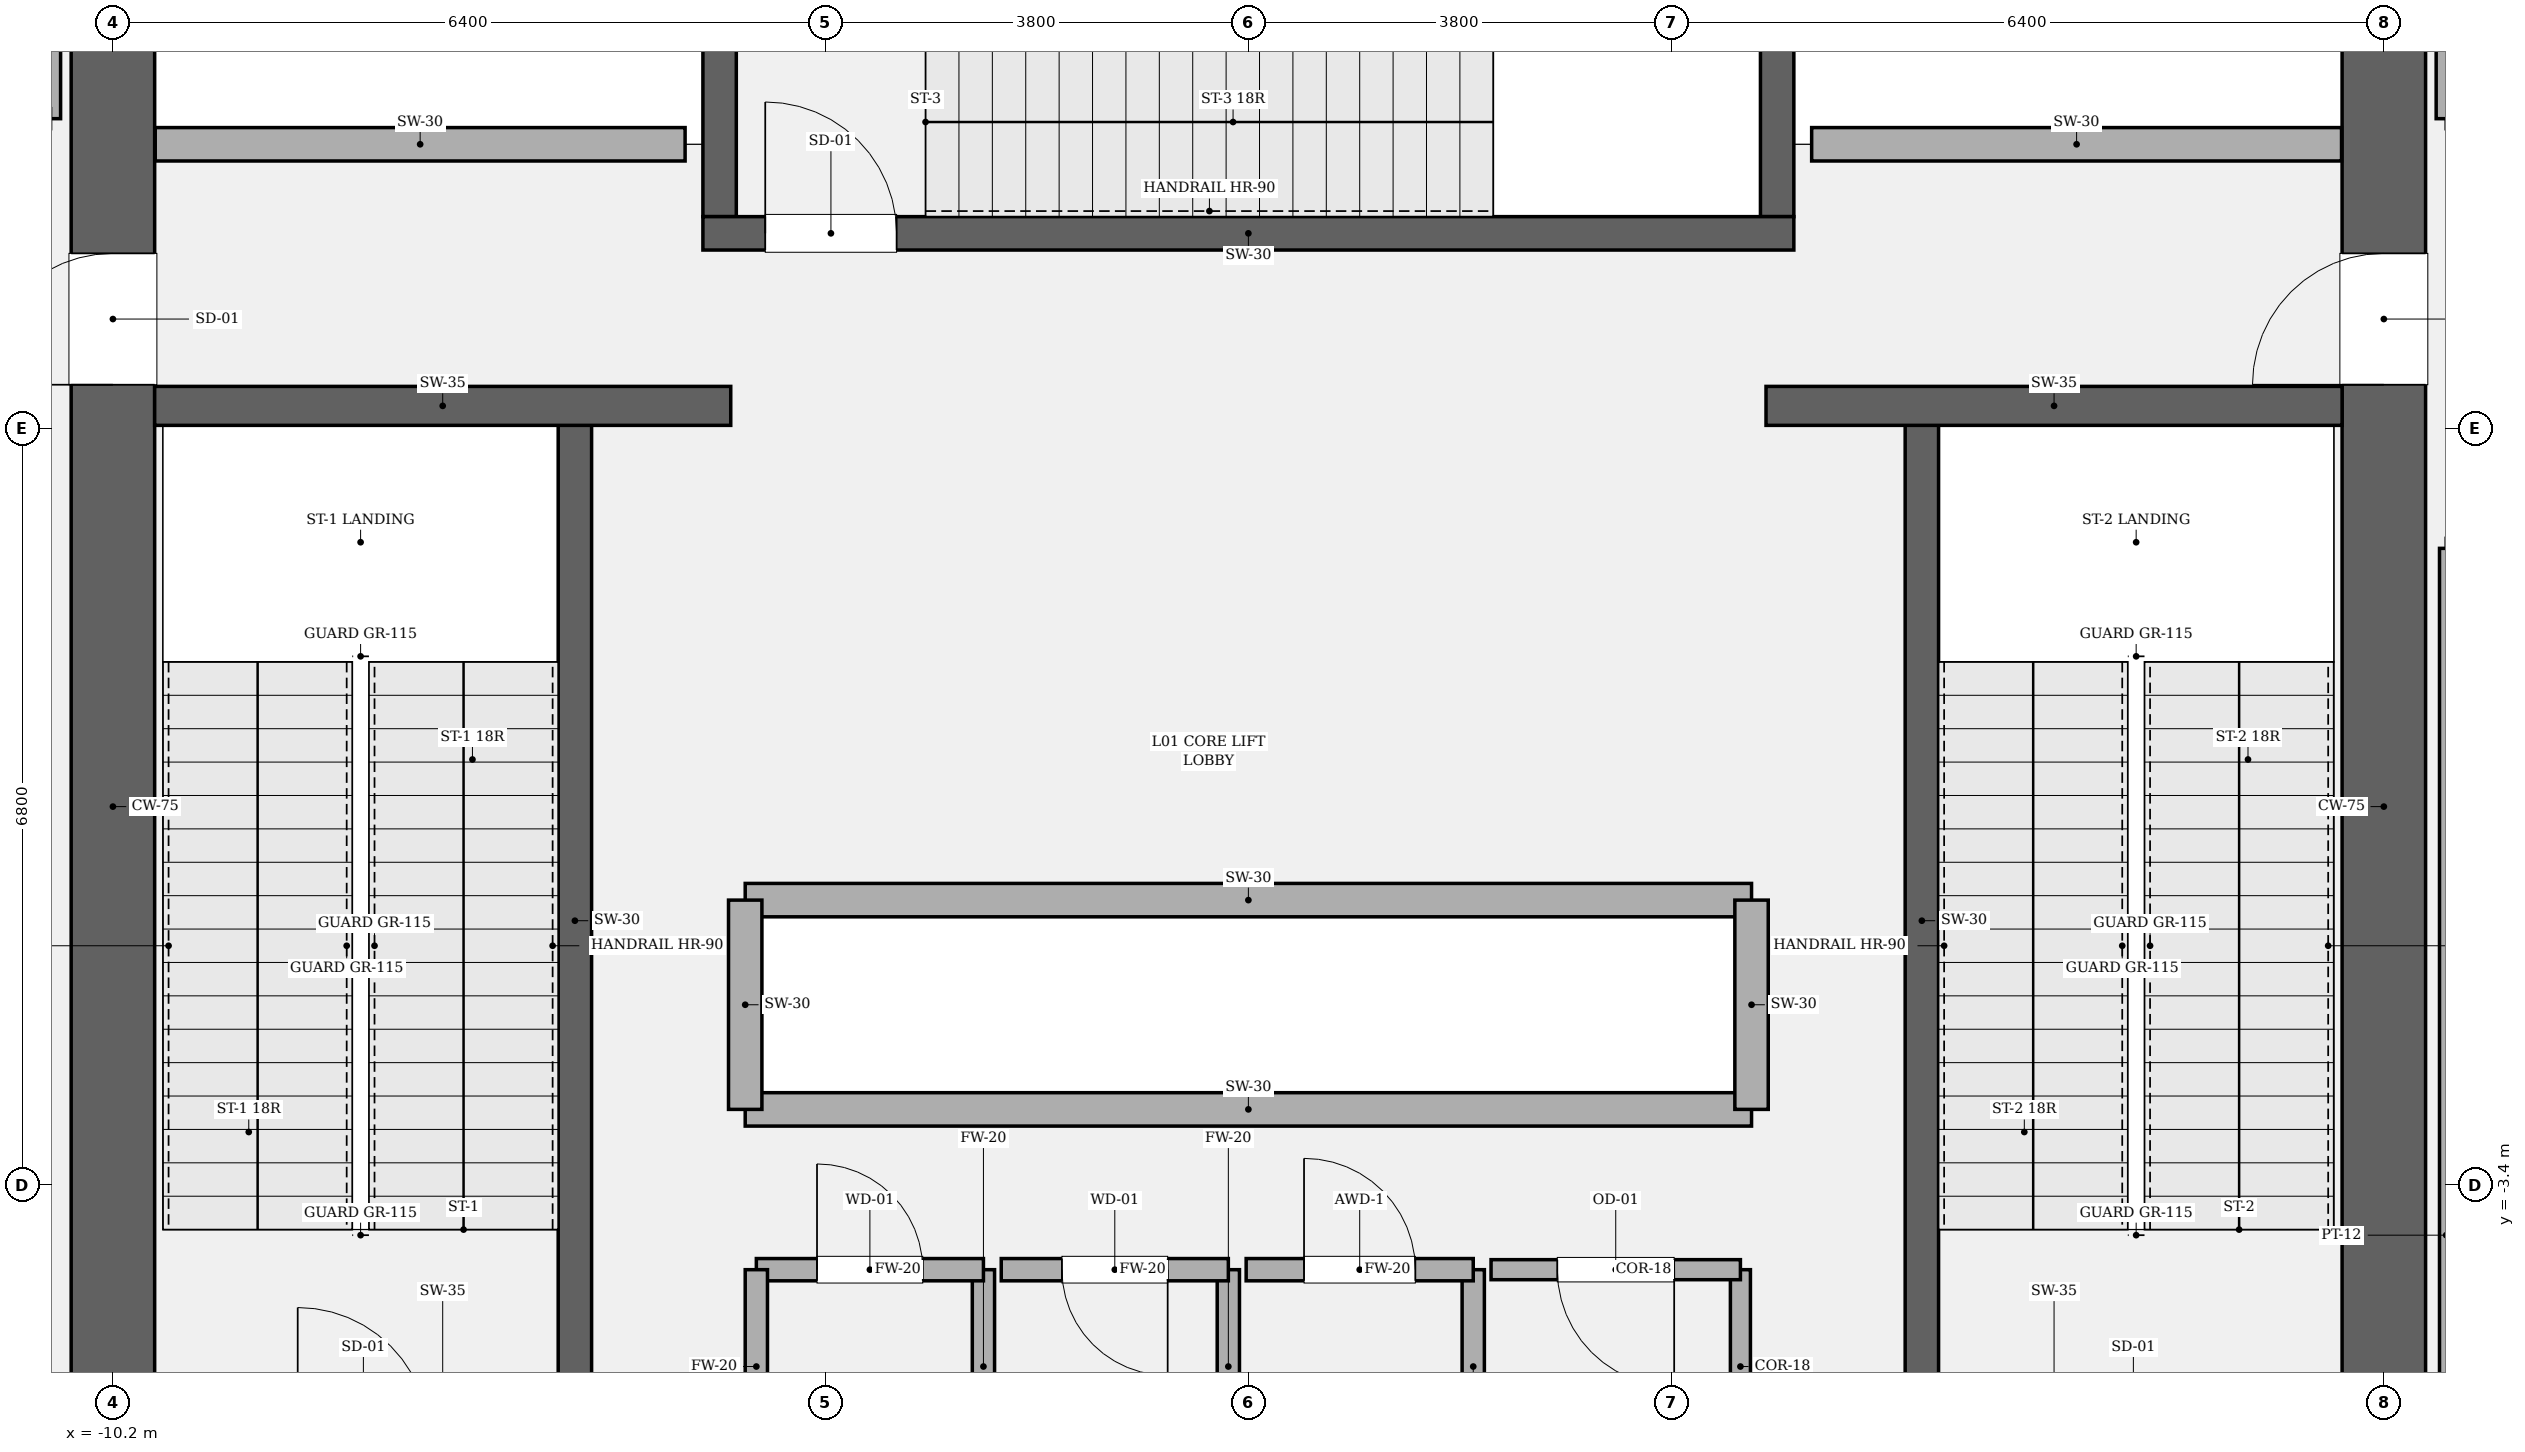
"""IFC4 building model, lengths in metres.
Left out: names, types, materials, properties, quantities, classifications, styles, units other than length and angle.
Written with IfcOpenShell. Run it as: python <this file> out.ifc"""

import sys

from ifc_helpers import new_model, si_unit, direction, frame, frame_2d, origin, place, context, subcontext, project, spatial, rectangle, extrude, element, fill, save


model = new_model("IFC4")
c1 = context("Model", 3, precision=1e-05, world=origin(), true_north=direction((0.0, 1.0)))
c2 = subcontext(c1, "Body", "Model", "MODEL_VIEW")
j1 = project(units=[si_unit("LENGTHUNIT", "METRE"), si_unit("PLANEANGLEUNIT", "RADIAN")], contexts=[c1])
p1 = place(None, origin())
s1 = spatial("IfcSite", under=j1, at=p1, CompositionType="ELEMENT")
p2 = place(p1, origin())
s2 = spatial("IfcBuilding", under=s1, at=p2, CompositionType="ELEMENT")
p3 = place(p2, frame((0.0, 0.0, 6.0)))
s3 = spatial("IfcBuildingStorey", under=s2, at=p3, CompositionType="ELEMENT", Elevation=6.0)
p4 = place(p3, frame((-10.2, -8.825, 0.0), z_axis=(0.0, 0.0, 1.0), x_axis=(0.0, 1.0, 0.0)))
e1 = element("IfcWall", 1, at=p4, inside=s3, PredefinedType="SHEAR", context=c2, shape_type="SweptSolid", body=[
    extrude(rectangle(XDim=17.65, YDim=0.75, at=frame_2d((8.825, 0.0))), origin(), (0.0, 0.0, 1.0), 5.4),
])
p5 = place(p4, frame((12.615, 0.0, 0.0)))
e2 = element("IfcOpeningElement", 2, at=p5, cuts=e1, PredefinedType="OPENING", context=c2, shape_type="SweptSolid", body=[
    extrude(rectangle(XDim=1.18, YDim=2.2, at=frame_2d((0.59, 1.1))), frame((0.0, 0.385, 0.0), z_axis=(0.0, -1.0, 0.0), x_axis=(1.0, 0.0, 0.0)), (0.0, 0.0, 1.0), 0.77),
])
p6 = place(p3, frame((10.2, 8.825, 0.0), z_axis=(0.0, 0.0, 1.0), x_axis=(0.0, -1.0, 0.0)))
e3 = element("IfcWall", 3, at=p6, inside=s3, PredefinedType="SHEAR", context=c2, shape_type="SweptSolid", body=[
    extrude(rectangle(XDim=17.65, YDim=0.75, at=frame_2d((8.825, 0.0))), origin(), (0.0, 0.0, 1.0), 5.4),
])
p7 = place(p6, frame((3.855, 0.0, 0.0)))
e4 = element("IfcOpeningElement", 4, at=p7, cuts=e3, PredefinedType="OPENING", context=c2, shape_type="SweptSolid", body=[
    extrude(rectangle(XDim=1.18, YDim=2.2, at=frame_2d((0.59, 1.1))), frame((0.0, 0.385, 0.0), z_axis=(0.0, -1.0, 0.0), x_axis=(1.0, 0.0, 0.0)), (0.0, 0.0, 1.0), 0.77),
])
for number, where, z_axis, x_axis in (
    (5, (-6.05, -5.5, 0.0), (0.0, 0.0, 1.0), (0.0, 1.0, 0.0)),
    (6, (6.05, 3.45, 0.0), (0.0, 0.0, 1.0), (0.0, -1.0, 0.0)),
):
    element("IfcWall", number, at=place(p3, frame(where, z_axis=z_axis, x_axis=x_axis)), inside=s3, PredefinedType="SOLIDWALL", context=c2, shape_type="SweptSolid", body=[
        extrude(rectangle(XDim=8.95, YDim=0.3, at=frame_2d((4.475, 0.0))), origin(), (0.0, 0.0, 1.0), 5.4),
    ])
for number, where, z_axis, x_axis in (
    (7, (-4.75, 5.3, 0.0), (0.0, 0.0, 1.0), (0.0, 1.0, 0.0)),
    (8, (4.75, 8.825, 0.0), (0.0, 0.0, 1.0), (0.0, -1.0, 0.0)),
):
    element("IfcWall", number, at=place(p3, frame(where, z_axis=z_axis, x_axis=x_axis)), inside=s3, PredefinedType="SOLIDWALL", context=c2, shape_type="SweptSolid", body=[
        extrude(rectangle(XDim=3.525, YDim=0.3, at=frame_2d((1.762, 0.0))), origin(), (0.0, 0.0, 1.0), 5.4),
    ])
p8 = place(p3, frame((-4.9, 5.15, 0.0), z_axis=(0.0, 0.0, 1.0), x_axis=(1.0, 0.0, 0.0)))
e9 = element("IfcWall", 9, at=p8, inside=s3, PredefinedType="SOLIDWALL", context=c2, shape_type="SweptSolid", body=[
    extrude(rectangle(XDim=9.8, YDim=0.3, at=frame_2d((4.9, 0.0))), origin(), (0.0, 0.0, 1.0), 5.4),
])
p9 = place(p8, frame((0.56, 0.0, 0.0)))
e10 = element("IfcOpeningElement", 10, at=p9, cuts=e9, PredefinedType="OPENING", context=c2, shape_type="SweptSolid", body=[
    extrude(rectangle(XDim=1.18, YDim=2.2, at=frame_2d((0.59, 1.1))), frame((0.0, 0.16, 0.0), z_axis=(0.0, -1.0, 0.0), x_axis=(1.0, 0.0, 0.0)), (0.0, 0.0, 1.0), 0.32),
])
for number, where, z_axis, x_axis in (
    (11, (-9.825, 3.6, 0.0), (0.0, 0.0, 1.0), (1.0, 0.0, 0.0)),
    (12, (4.65, 3.6, 0.0), (0.0, 0.0, 1.0), (1.0, 0.0, 0.0)),
):
    element("IfcWall", number, at=place(p3, frame(where, z_axis=z_axis, x_axis=x_axis)), inside=s3, PredefinedType="SOLIDWALL", context=c2, shape_type="SweptSolid", body=[
        extrude(rectangle(XDim=5.175, YDim=0.35, at=frame_2d((2.587, 0.0))), origin(), (0.0, 0.0, 1.0), 5.4),
    ])
for number, where, z_axis, x_axis in (
    (13, (-4.52, -0.84, 0.0), (0.0, 0.0, 1.0), (1.0, 0.0, 0.0)),
    (14, (-4.52, -2.72, 0.0), (0.0, 0.0, 1.0), (1.0, 0.0, 0.0)),
):
    element("IfcWall", number, at=place(p3, frame(where, z_axis=z_axis, x_axis=x_axis)), inside=s3, PredefinedType="SOLIDWALL", context=c2, shape_type="SweptSolid", body=[
        extrude(rectangle(XDim=9.04, YDim=0.3, at=frame_2d((4.52, 0.0))), origin(), (0.0, 0.0, 1.0), 5.12),
    ])
for number, where, z_axis, x_axis in (
    (15, (-4.52, -2.72, 0.0), (0.0, 0.0, 1.0), (0.0, 1.0, 0.0)),
    (16, (4.52, -2.72, 0.0), (0.0, 0.0, 1.0), (0.0, 1.0, 0.0)),
):
    element("IfcWall", number, at=place(p3, frame(where, z_axis=z_axis, x_axis=x_axis)), inside=s3, PredefinedType="SOLIDWALL", context=c2, shape_type="SweptSolid", body=[
        extrude(rectangle(XDim=1.88, YDim=0.3, at=frame_2d((0.94, 0.0))), origin(), (0.0, 0.0, 1.0), 5.12),
    ])
for number, where, z_axis, x_axis in (
    (17, (-9.82, 5.95, 0.0), (0.0, 0.0, 1.0), (1.0, 0.0, 0.0)),
    (18, (5.06, 5.95, 0.0), (0.0, 0.0, 1.0), (1.0, 0.0, 0.0)),
):
    element("IfcWall", number, at=place(p3, frame(where, z_axis=z_axis, x_axis=x_axis)), inside=s3, PredefinedType="SOLIDWALL", context=c2, shape_type="SweptSolid", body=[
        extrude(rectangle(XDim=4.76, YDim=0.3, at=frame_2d((2.38, 0.0))), origin(), (0.0, 0.0, 1.0), 5.12),
    ])
p10 = place(p3, frame((-2.38, -5.9, 0.0), z_axis=(0.0, 0.0, 1.0), x_axis=(0.0, 1.0, 0.0)))
e19 = element("IfcWall", 19, at=p10, inside=s3, PredefinedType="SOLIDWALL", context=c2, shape_type="SweptSolid", body=[
    extrude(rectangle(XDim=1.74, YDim=0.2, at=frame_2d((0.87, 0.0))), origin(), (0.0, 0.0, 1.0), 5.12),
])
p11 = place(p3, frame((-2.38, -4.16, 0.0), z_axis=(0.0, 0.0, 1.0), x_axis=(-1.0, 0.0, 0.0)))
e20 = element("IfcWall", 20, at=p11, inside=s3, PredefinedType="SOLIDWALL", context=c2, shape_type="SweptSolid", body=[
    extrude(rectangle(XDim=2.04, YDim=0.2, at=frame_2d((1.02, 0.0))), origin(), (0.0, 0.0, 1.0), 5.12),
])
p12 = place(p11, frame((0.545, 0.0, 0.0)))
e21 = element("IfcOpeningElement", 21, at=p12, cuts=e20, PredefinedType="OPENING", context=c2, shape_type="SweptSolid", body=[
    extrude(rectangle(XDim=0.95, YDim=2.15, at=frame_2d((0.475, 1.075))), frame((0.0, 0.11, 0.0), z_axis=(0.0, -1.0, 0.0), x_axis=(1.0, 0.0, 0.0)), (0.0, 0.0, 1.0), 0.22),
])
for number, where, z_axis, x_axis in (
    (22, (-4.42, -4.16, 0.0), (0.0, 0.0, 1.0), (0.0, -1.0, 0.0)),
    (23, (-0.18, -5.9, 0.0), (0.0, 0.0, 1.0), (0.0, 1.0, 0.0)),
):
    element("IfcWall", number, at=place(p3, frame(where, z_axis=z_axis, x_axis=x_axis)), inside=s3, PredefinedType="SOLIDWALL", context=c2, shape_type="SweptSolid", body=[
        extrude(rectangle(XDim=1.74, YDim=0.2, at=frame_2d((0.87, 0.0))), origin(), (0.0, 0.0, 1.0), 5.12),
    ])
p13 = place(p3, frame((-0.18, -4.16, 0.0), z_axis=(0.0, 0.0, 1.0), x_axis=(-1.0, 0.0, 0.0)))
e24 = element("IfcWall", 24, at=p13, inside=s3, PredefinedType="SOLIDWALL", context=c2, shape_type="SweptSolid", body=[
    extrude(rectangle(XDim=2.04, YDim=0.2, at=frame_2d((1.02, 0.0))), origin(), (0.0, 0.0, 1.0), 5.12),
])
p14 = place(p13, frame((0.545, 0.0, 0.0)))
e25 = element("IfcOpeningElement", 25, at=p14, cuts=e24, PredefinedType="OPENING", context=c2, shape_type="SweptSolid", body=[
    extrude(rectangle(XDim=0.95, YDim=2.15, at=frame_2d((0.475, 1.075))), frame((0.0, 0.11, 0.0), z_axis=(0.0, -1.0, 0.0), x_axis=(1.0, 0.0, 0.0)), (0.0, 0.0, 1.0), 0.22),
])
p15 = place(p3, frame((2.02, -5.9, 0.0), z_axis=(0.0, 0.0, 1.0), x_axis=(0.0, 1.0, 0.0)))
e26 = element("IfcWall", 26, at=p15, inside=s3, PredefinedType="SOLIDWALL", context=c2, shape_type="SweptSolid", body=[
    extrude(rectangle(XDim=1.74, YDim=0.2, at=frame_2d((0.87, 0.0))), origin(), (0.0, 0.0, 1.0), 5.12),
])
p16 = place(p3, frame((2.02, -4.16, 0.0), z_axis=(0.0, 0.0, 1.0), x_axis=(-1.0, 0.0, 0.0)))
e27 = element("IfcWall", 27, at=p16, inside=s3, PredefinedType="SOLIDWALL", context=c2, shape_type="SweptSolid", body=[
    extrude(rectangle(XDim=2.04, YDim=0.2, at=frame_2d((1.02, 0.0))), origin(), (0.0, 0.0, 1.0), 5.12),
])
p17 = place(p16, frame((0.52, 0.0, 0.0)))
e28 = element("IfcOpeningElement", 28, at=p17, cuts=e27, PredefinedType="OPENING", context=c2, shape_type="SweptSolid", body=[
    extrude(rectangle(XDim=1.0, YDim=2.15, at=frame_2d((0.5, 1.075))), frame((0.0, 0.11, 0.0), z_axis=(0.0, -1.0, 0.0), x_axis=(1.0, 0.0, 0.0)), (0.0, 0.0, 1.0), 0.22),
])
p18 = place(p3, frame((4.42, -5.9, 0.0), z_axis=(0.0, 0.0, 1.0), x_axis=(0.0, 1.0, 0.0)))
e29 = element("IfcWall", 29, at=p18, inside=s3, PredefinedType="PARTITIONING", context=c2, shape_type="SweptSolid", body=[
    extrude(rectangle(XDim=1.74, YDim=0.18, at=frame_2d((0.87, 0.0))), origin(), (0.0, 0.0, 1.0), 5.12),
])
p19 = place(p3, frame((4.42, -4.16, 0.0), z_axis=(0.0, 0.0, 1.0), x_axis=(-1.0, 0.0, 0.0)))
e30 = element("IfcWall", 30, at=p19, inside=s3, PredefinedType="PARTITIONING", context=c2, shape_type="SweptSolid", body=[
    extrude(rectangle(XDim=2.24, YDim=0.18, at=frame_2d((1.12, 0.0))), origin(), (0.0, 0.0, 1.0), 5.12),
])
p20 = place(p19, frame((0.595, 0.0, 0.0)))
e31 = element("IfcOpeningElement", 31, at=p20, cuts=e30, PredefinedType="OPENING", context=c2, shape_type="SweptSolid", body=[
    extrude(rectangle(XDim=1.05, YDim=2.2, at=frame_2d((0.525, 1.1))), frame((0.0, 0.1, 0.0), z_axis=(0.0, -1.0, 0.0), x_axis=(1.0, 0.0, 0.0)), (0.0, 0.0, 1.0), 0.2),
])
for number, where, z_axis, x_axis in (
    (32, (-10.76, 14.42, 0.0), (0.0, 0.0, 1.0), (0.0, -1.0, 0.0)),
    (33, (10.76, 6.18, 0.0), (0.0, 0.0, 1.0), (0.0, 1.0, 0.0)),
):
    element("IfcWall", number, at=place(p3, frame(where, z_axis=z_axis, x_axis=x_axis)), inside=s3, PredefinedType="PARTITIONING", context=c2, shape_type="SweptSolid", body=[
        extrude(rectangle(XDim=8.24, YDim=0.18, at=frame_2d((4.12, 0.0))), origin(), (0.0, 0.0, 1.0), 4.414),
    ])
p21 = place(p3, frame((10.76, -10.02, 0.0), z_axis=(0.0, 0.0, 1.0), x_axis=(0.0, 1.0, 0.0)))
e34 = element("IfcWall", 34, at=p21, inside=s3, PredefinedType="PARTITIONING", context=c2, shape_type="SweptSolid", body=[
    extrude(rectangle(XDim=12.34, YDim=0.12, at=frame_2d((6.17, 0.0))), origin(), (0.0, 0.0, 1.0), 4.414),
])
p22 = place(p9, origin())
e35 = element("IfcDoor", 35, at=p22, inside=s3, OperationType="SINGLE_SWING_LEFT", PredefinedType="DOOR", context=c2, shape_type="SweptSolid", body=[
    extrude(rectangle(XDim=1.18, YDim=2.2, at=frame_2d((0.59, 1.1))), frame((0.0, 0.025, 0.0), z_axis=(0.0, -1.0, 0.0), x_axis=(1.0, 0.0, 0.0)), (0.0, 0.0, 1.0), 0.05),
])
fill(e10, e35)
p23 = place(p5, origin())
e36 = element("IfcDoor", 36, at=p23, inside=s3, OperationType="SINGLE_SWING_LEFT", PredefinedType="DOOR", context=c2, shape_type="SweptSolid", body=[
    extrude(rectangle(XDim=1.18, YDim=2.2, at=frame_2d((0.59, 1.1))), frame((0.0, 0.025, 0.0), z_axis=(0.0, -1.0, 0.0), x_axis=(1.0, 0.0, 0.0)), (0.0, 0.0, 1.0), 0.05),
])
fill(e2, e36)
p24 = place(p7, origin())
e37 = element("IfcDoor", 37, at=p24, inside=s3, OperationType="SINGLE_SWING_RIGHT", PredefinedType="DOOR", context=c2, shape_type="SweptSolid", body=[
    extrude(rectangle(XDim=1.18, YDim=2.2, at=frame_2d((0.59, 1.1))), frame((0.0, 0.025, 0.0), z_axis=(0.0, -1.0, 0.0), x_axis=(1.0, 0.0, 0.0)), (0.0, 0.0, 1.0), 0.05),
])
fill(e4, e37)
p25 = place(p12, origin())
e38 = element("IfcDoor", 38, at=p25, inside=s3, OperationType="SINGLE_SWING_RIGHT", PredefinedType="DOOR", context=c2, shape_type="SweptSolid", body=[
    extrude(rectangle(XDim=0.95, YDim=2.15, at=frame_2d((0.475, 1.075))), frame((0.0, 0.025, 0.0), z_axis=(0.0, -1.0, 0.0), x_axis=(1.0, 0.0, 0.0)), (0.0, 0.0, 1.0), 0.05),
])
fill(e21, e38)
p26 = place(p14, origin())
e39 = element("IfcDoor", 39, at=p26, inside=s3, OperationType="SINGLE_SWING_LEFT", PredefinedType="DOOR", context=c2, shape_type="SweptSolid", body=[
    extrude(rectangle(XDim=0.95, YDim=2.15, at=frame_2d((0.475, 1.075))), frame((0.0, 0.025, 0.0), z_axis=(0.0, -1.0, 0.0), x_axis=(1.0, 0.0, 0.0)), (0.0, 0.0, 1.0), 0.05),
])
fill(e25, e39)
p27 = place(p17, origin())
e40 = element("IfcDoor", 40, at=p27, inside=s3, OperationType="SINGLE_SWING_RIGHT", PredefinedType="DOOR", context=c2, shape_type="SweptSolid", body=[
    extrude(rectangle(XDim=1.0, YDim=2.15, at=frame_2d((0.5, 1.075))), frame((0.0, 0.025, 0.0), z_axis=(0.0, -1.0, 0.0), x_axis=(1.0, 0.0, 0.0)), (0.0, 0.0, 1.0), 0.05),
])
fill(e28, e40)
p28 = place(p20, origin())
e41 = element("IfcDoor", 41, at=p28, inside=s3, OperationType="SINGLE_SWING_LEFT", PredefinedType="DOOR", context=c2, shape_type="SweptSolid", body=[
    extrude(rectangle(XDim=1.05, YDim=2.2, at=frame_2d((0.525, 1.1))), frame((0.0, 0.025, 0.0), z_axis=(0.0, -1.0, 0.0), x_axis=(1.0, 0.0, 0.0)), (0.0, 0.0, 1.0), 0.05),
])
fill(e31, e41)
save(model, sys.argv[1])
